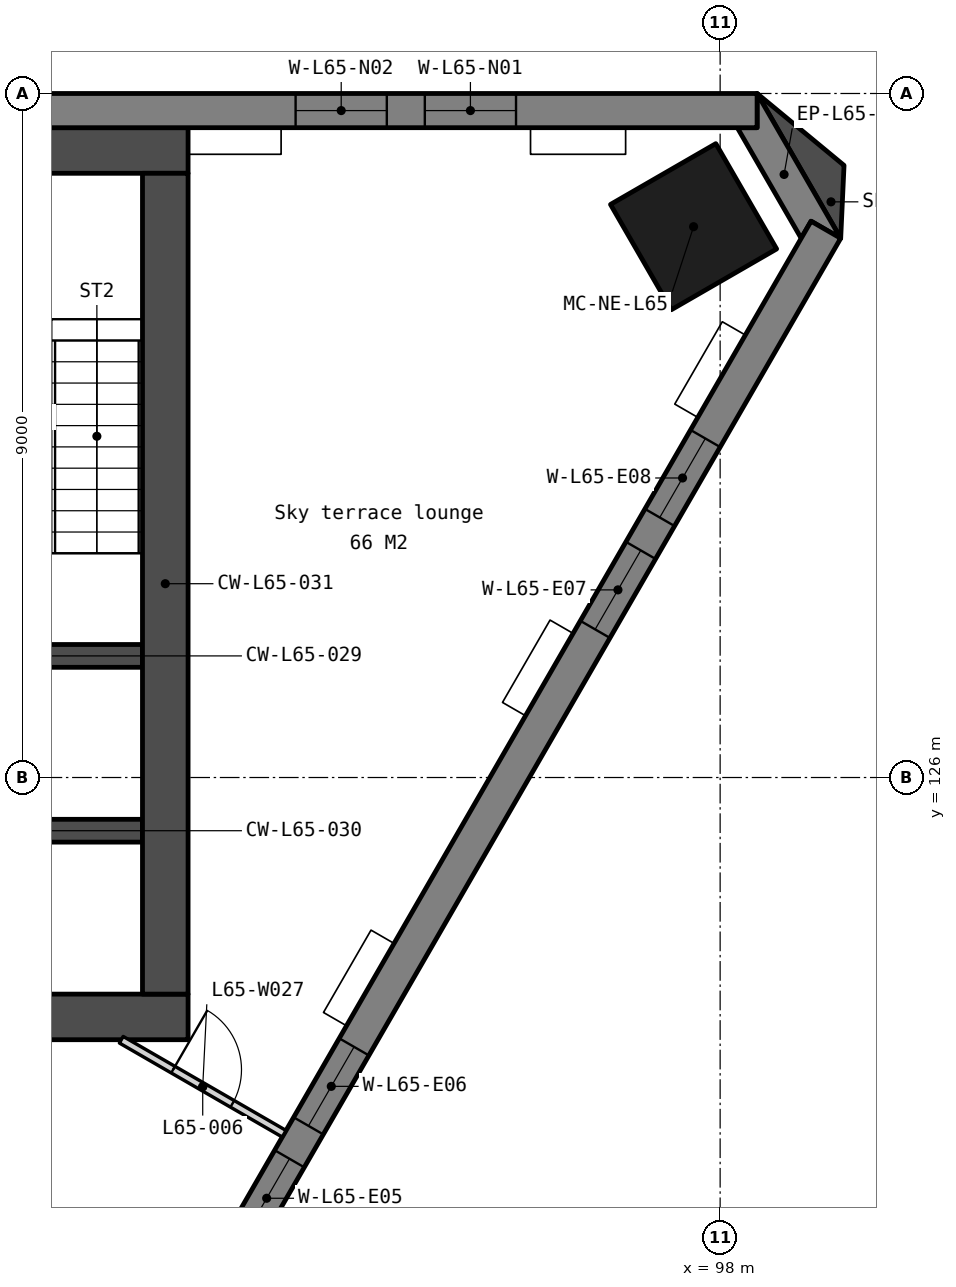
"""IFC4 building model, lengths in metres.
Left out: names, types, materials, properties, quantities, classifications, styles, units other than length and angle.
Written with IfcOpenShell. Run it as: python <this file> out.ifc"""

import sys

from ifc_helpers import new_model, si_unit, direction, frame, frame_2d, origin, origin_2d, place, context, subcontext, project, spatial, polyline, rectangle, outline, extrude, element, fill, save


model = new_model("IFC4")
c1 = context("Model", 3, precision=1e-05, world=origin(), true_north=direction((0.0, 1.0)))
c2 = subcontext(c1, "Body", "Model", "MODEL_VIEW")
j1 = project(units=[si_unit("LENGTHUNIT", "METRE"), si_unit("PLANEANGLEUNIT", "RADIAN")], contexts=[c1])
p1 = place(None, origin())
s1 = spatial("IfcSite", under=j1, at=p1, CompositionType="ELEMENT")
p2 = place(p1, origin())
s2 = spatial("IfcBuilding", under=s1, at=p2, CompositionType="ELEMENT")
p3 = place(p2, frame((0.0, 0.0, 266.0)))
s3 = spatial("IfcBuildingStorey", under=s2, at=p3, CompositionType="ELEMENT", Elevation=266.0)
p4 = place(p3, frame((97.651, 133.247, 0.0), z_axis=(0.0, 0.0, 1.0), x_axis=(-0.5, 0.866025403784, 0.0)))
e1 = element("IfcColumn", 1, at=p4, inside=s3, PredefinedType="COLUMN", context=c2, shape_type="SweptSolid", body=[
    extrude(rectangle(XDim=1.6, YDim=1.6, at=origin_2d()), origin(), (0.0, 0.0, 1.0), 3.9),
])
p5 = place(p3, frame((69.0, 134.25, 0.0), z_axis=(0.0, 0.0, 1.0), x_axis=(1.0, 0.0, 0.0)))
e2 = element("IfcWall", 2, at=p5, inside=s3, PredefinedType="SOLIDWALL", context=c2, shape_type="SweptSolid", body=[
    extrude(rectangle(XDim=22.0, YDim=0.6, at=frame_2d((11.0, 0.0))), origin(), (0.0, 0.0, 1.0), 3.75),
])
p6 = place(p3, frame((69.0, 122.85, 0.0), z_axis=(0.0, 0.0, 1.0), x_axis=(1.0, 0.0, 0.0)))
e3 = element("IfcWall", 3, at=p6, inside=s3, PredefinedType="SOLIDWALL", context=c2, shape_type="SweptSolid", body=[
    extrude(rectangle(XDim=22.0, YDim=0.6, at=frame_2d((11.0, 0.0))), origin(), (0.0, 0.0, 1.0), 3.75),
])
p7 = place(p6, frame((16.375, 0.0, 0.0)))
e4 = element("IfcOpeningElement", 4, at=p7, cuts=e3, PredefinedType="OPENING", context=c2, shape_type="SweptSolid", body=[
    extrude(rectangle(XDim=1.8, YDim=2.1, at=frame_2d((0.9, 1.05))), frame((0.0, 0.31, 0.0), z_axis=(0.0, -1.0, 0.0), x_axis=(1.0, 0.0, 0.0)), (0.0, 0.0, 1.0), 0.62),
])
p8 = place(p6, frame((3.825, 0.0, 0.0)))
e5 = element("IfcOpeningElement", 5, at=p8, cuts=e3, PredefinedType="OPENING", context=c2, shape_type="SweptSolid", body=[
    extrude(rectangle(XDim=1.8, YDim=2.1, at=frame_2d((0.9, 1.05))), frame((0.0, 0.31, 0.0), z_axis=(0.0, -1.0, 0.0), x_axis=(1.0, 0.0, 0.0)), (0.0, 0.0, 1.0), 0.62),
])
p9 = place(p6, frame((12.85, 0.0, 0.0)))
e6 = element("IfcOpeningElement", 6, at=p9, cuts=e3, PredefinedType="OPENING", context=c2, shape_type="SweptSolid", body=[
    extrude(rectangle(XDim=1.5, YDim=2.1, at=frame_2d((0.75, 1.05))), frame((0.0, 0.31, 0.0), z_axis=(0.0, -1.0, 0.0), x_axis=(1.0, 0.0, 0.0)), (0.0, 0.0, 1.0), 0.62),
])
for number, where, z_axis, x_axis in (
    (7, (87.85, 127.6, 0.0), (0.0, 0.0, 1.0), (1.0, 0.0, 0.0)),
    (8, (87.85, 125.3, 0.0), (0.0, 0.0, 1.0), (1.0, 0.0, 0.0)),
):
    element("IfcWall", number, at=place(p3, frame(where, z_axis=z_axis, x_axis=x_axis)), inside=s3, PredefinedType="SOLIDWALL", context=c2, shape_type="SweptSolid", body=[
        extrude(rectangle(XDim=2.55, YDim=0.3, at=frame_2d((1.275, 0.0))), origin(), (0.0, 0.0, 1.0), 3.75),
    ])
p10 = place(p3, frame((90.7, 133.95, 0.0), z_axis=(0.0, 0.0, 1.0), x_axis=(0.0, -1.0, 0.0)))
e9 = element("IfcWall", 9, at=p10, inside=s3, PredefinedType="SOLIDWALL", context=c2, shape_type="SweptSolid", body=[
    extrude(rectangle(XDim=10.8, YDim=0.6, at=frame_2d((5.4, 0.0))), origin(), (0.0, 0.0, 1.0), 3.75),
])
p11 = place(p3, frame((0.0, 0.0, -0.15)))
e10 = element("IfcWall", 10, at=p11, inside=s3, PredefinedType="SOLIDWALL", context=c2, shape_type="SweptSolid", body=[
    extrude(outline(polyline([(99.586, 133.095), (99.197, 133.32), (99.067, 133.095), (98.226, 134.55), (98.486, 134.55), (98.486, 135.0), (99.586, 133.095)])), origin(), (0.0, 0.0, 1.0), 3.9),
])
p12 = place(p3, frame((98.486, 134.775, -0.15), z_axis=(0.0, 0.0, 1.0), x_axis=(-1.0, 0.0, 0.0)))
e11 = element("IfcWall", 11, at=p12, inside=s3, PredefinedType="SOLIDWALL", context=c2, shape_type="SweptSolid", body=[
    extrude(outline(polyline([(36.972, 0.0), (36.972, 3.9), (0.0, 3.9), (0.0, 0.0), (36.972, 0.0)])), frame((0.0, 0.225, 0.0), z_axis=(0.0, -1.0, 0.0), x_axis=(1.0, 0.0, 0.0)), (0.0, 0.0, 1.0), 0.45),
])
p13 = place(p12, frame((3.172, 0.0, 0.95)))
e12 = element("IfcOpeningElement", 12, at=p13, cuts=e11, PredefinedType="OPENING", context=c2, shape_type="SweptSolid", body=[
    extrude(rectangle(XDim=1.2, YDim=2.2, at=frame_2d((0.6, 1.1))), frame((0.0, 0.235, 0.0), z_axis=(0.0, -1.0, 0.0), x_axis=(1.0, 0.0, 0.0)), (0.0, 0.0, 1.0), 0.47),
])
p14 = place(p12, frame((4.872, 0.0, 0.95)))
e13 = element("IfcOpeningElement", 13, at=p14, cuts=e11, PredefinedType="OPENING", context=c2, shape_type="SweptSolid", body=[
    extrude(rectangle(XDim=1.2, YDim=2.2, at=frame_2d((0.6, 1.1))), frame((0.0, 0.235, 0.0), z_axis=(0.0, -1.0, 0.0), x_axis=(1.0, 0.0, 0.0)), (0.0, 0.0, 1.0), 0.47),
])
p15 = place(p12, frame((12.415, 0.0, 0.95)))
e14 = element("IfcOpeningElement", 14, at=p15, cuts=e11, PredefinedType="OPENING", context=c2, shape_type="SweptSolid", body=[
    extrude(rectangle(XDim=1.2, YDim=2.2, at=frame_2d((0.6, 1.1))), frame((0.0, 0.235, 0.0), z_axis=(0.0, -1.0, 0.0), x_axis=(1.0, 0.0, 0.0)), (0.0, 0.0, 1.0), 0.47),
])
p16 = place(p12, frame((14.115, 0.0, 0.95)))
e15 = element("IfcOpeningElement", 15, at=p16, cuts=e11, PredefinedType="OPENING", context=c2, shape_type="SweptSolid", body=[
    extrude(rectangle(XDim=1.2, YDim=2.2, at=frame_2d((0.6, 1.1))), frame((0.0, 0.235, 0.0), z_axis=(0.0, -1.0, 0.0), x_axis=(1.0, 0.0, 0.0)), (0.0, 0.0, 1.0), 0.47),
])
p17 = place(p12, frame((21.658, 0.0, 0.95)))
e16 = element("IfcOpeningElement", 16, at=p17, cuts=e11, PredefinedType="OPENING", context=c2, shape_type="SweptSolid", body=[
    extrude(rectangle(XDim=1.2, YDim=2.2, at=frame_2d((0.6, 1.1))), frame((0.0, 0.235, 0.0), z_axis=(0.0, -1.0, 0.0), x_axis=(1.0, 0.0, 0.0)), (0.0, 0.0, 1.0), 0.47),
])
p18 = place(p12, frame((23.358, 0.0, 0.95)))
e17 = element("IfcOpeningElement", 17, at=p18, cuts=e11, PredefinedType="OPENING", context=c2, shape_type="SweptSolid", body=[
    extrude(rectangle(XDim=1.2, YDim=2.2, at=frame_2d((0.6, 1.1))), frame((0.0, 0.235, 0.0), z_axis=(0.0, -1.0, 0.0), x_axis=(1.0, 0.0, 0.0)), (0.0, 0.0, 1.0), 0.47),
])
p19 = place(p12, frame((30.901, 0.0, 0.95)))
e18 = element("IfcOpeningElement", 18, at=p19, cuts=e11, PredefinedType="OPENING", context=c2, shape_type="SweptSolid", body=[
    extrude(rectangle(XDim=1.2, YDim=2.2, at=frame_2d((0.6, 1.1))), frame((0.0, 0.235, 0.0), z_axis=(0.0, -1.0, 0.0), x_axis=(1.0, 0.0, 0.0)), (0.0, 0.0, 1.0), 0.47),
])
p20 = place(p12, frame((32.601, 0.0, 0.95)))
e19 = element("IfcOpeningElement", 19, at=p20, cuts=e11, PredefinedType="OPENING", context=c2, shape_type="SweptSolid", body=[
    extrude(rectangle(XDim=1.2, YDim=2.2, at=frame_2d((0.6, 1.1))), frame((0.0, 0.235, 0.0), z_axis=(0.0, -1.0, 0.0), x_axis=(1.0, 0.0, 0.0)), (0.0, 0.0, 1.0), 0.47),
])
p21 = place(p3, frame((80.905, 101.188, -0.15), z_axis=(0.0, 0.0, 1.0), x_axis=(0.500002536638, 0.866023939251, 0.0)))
e20 = element("IfcWall", 20, at=p21, inside=s3, PredefinedType="SOLIDWALL", context=c2, shape_type="SweptSolid", body=[
    extrude(outline(polyline([(36.972, 0.0), (36.972, 3.9), (0.0, 3.9), (0.0, 0.0), (36.972, 0.0)])), frame((0.0, 0.225, 0.0), z_axis=(0.0, -1.0, 0.0), x_axis=(1.0, 0.0, 0.0)), (0.0, 0.0, 1.0), 0.45),
])
p22 = place(p21, frame((3.172, 0.0, 0.95)))
e21 = element("IfcOpeningElement", 21, at=p22, cuts=e20, PredefinedType="OPENING", context=c2, shape_type="SweptSolid", body=[
    extrude(rectangle(XDim=1.2, YDim=2.2, at=frame_2d((0.6, 1.1))), frame((0.0, 0.235, 0.0), z_axis=(0.0, -1.0, 0.0), x_axis=(1.0, 0.0, 0.0)), (0.0, 0.0, 1.0), 0.47),
])
p23 = place(p21, frame((4.872, 0.0, 0.95)))
e22 = element("IfcOpeningElement", 22, at=p23, cuts=e20, PredefinedType="OPENING", context=c2, shape_type="SweptSolid", body=[
    extrude(rectangle(XDim=1.2, YDim=2.2, at=frame_2d((0.6, 1.1))), frame((0.0, 0.235, 0.0), z_axis=(0.0, -1.0, 0.0), x_axis=(1.0, 0.0, 0.0)), (0.0, 0.0, 1.0), 0.47),
])
p24 = place(p21, frame((12.415, 0.0, 0.95)))
e23 = element("IfcOpeningElement", 23, at=p24, cuts=e20, PredefinedType="OPENING", context=c2, shape_type="SweptSolid", body=[
    extrude(rectangle(XDim=1.2, YDim=2.2, at=frame_2d((0.6, 1.1))), frame((0.0, 0.235, 0.0), z_axis=(0.0, -1.0, 0.0), x_axis=(1.0, 0.0, 0.0)), (0.0, 0.0, 1.0), 0.47),
])
p25 = place(p21, frame((14.115, 0.0, 0.95)))
e24 = element("IfcOpeningElement", 24, at=p25, cuts=e20, PredefinedType="OPENING", context=c2, shape_type="SweptSolid", body=[
    extrude(rectangle(XDim=1.2, YDim=2.2, at=frame_2d((0.6, 1.1))), frame((0.0, 0.235, 0.0), z_axis=(0.0, -1.0, 0.0), x_axis=(1.0, 0.0, 0.0)), (0.0, 0.0, 1.0), 0.47),
])
p26 = place(p21, frame((21.658, 0.0, 0.95)))
e25 = element("IfcOpeningElement", 25, at=p26, cuts=e20, PredefinedType="OPENING", context=c2, shape_type="SweptSolid", body=[
    extrude(rectangle(XDim=1.2, YDim=2.2, at=frame_2d((0.6, 1.1))), frame((0.0, 0.235, 0.0), z_axis=(0.0, -1.0, 0.0), x_axis=(1.0, 0.0, 0.0)), (0.0, 0.0, 1.0), 0.47),
])
p27 = place(p21, frame((23.358, 0.0, 0.95)))
e26 = element("IfcOpeningElement", 26, at=p27, cuts=e20, PredefinedType="OPENING", context=c2, shape_type="SweptSolid", body=[
    extrude(rectangle(XDim=1.2, YDim=2.2, at=frame_2d((0.6, 1.1))), frame((0.0, 0.235, 0.0), z_axis=(0.0, -1.0, 0.0), x_axis=(1.0, 0.0, 0.0)), (0.0, 0.0, 1.0), 0.47),
])
p28 = place(p21, frame((30.901, 0.0, 0.95)))
e27 = element("IfcOpeningElement", 27, at=p28, cuts=e20, PredefinedType="OPENING", context=c2, shape_type="SweptSolid", body=[
    extrude(rectangle(XDim=1.2, YDim=2.2, at=frame_2d((0.6, 1.1))), frame((0.0, 0.235, 0.0), z_axis=(0.0, -1.0, 0.0), x_axis=(1.0, 0.0, 0.0)), (0.0, 0.0, 1.0), 0.47),
])
p29 = place(p21, frame((32.601, 0.0, 0.95)))
e28 = element("IfcOpeningElement", 28, at=p29, cuts=e20, PredefinedType="OPENING", context=c2, shape_type="SweptSolid", body=[
    extrude(rectangle(XDim=1.2, YDim=2.2, at=frame_2d((0.6, 1.1))), frame((0.0, 0.235, 0.0), z_axis=(0.0, -1.0, 0.0), x_axis=(1.0, 0.0, 0.0)), (0.0, 0.0, 1.0), 0.47),
])
p30 = place(p3, frame((0.0, 0.0, -0.15)))
e29 = element("IfcWall", 29, at=p30, inside=s3, PredefinedType="SOLIDWALL", context=c2, shape_type="SweptSolid", body=[
    extrude(outline(polyline([(99.586, 133.095), (99.63, 134.054), (98.486, 135.0), (99.586, 133.095)])), origin(), (0.0, 0.0, 1.0), 3.9),
])
p31 = place(p3, frame((90.121, 122.55, 0.0), z_axis=(0.0, 0.0, 1.0), x_axis=(0.86604923931, -0.499958713387, 0.0)))
e30 = element("IfcWall", 30, at=p31, inside=s3, PredefinedType="PARTITIONING", context=c2, shape_type="SweptSolid", body=[
    extrude(rectangle(XDim=2.475, YDim=0.1, at=frame_2d((1.237, 0.0))), origin(), (0.0, 0.0, 1.0), 3.75),
])
p32 = place(p31, frame((0.787, 0.0, 0.0)))
e31 = element("IfcOpeningElement", 31, at=p32, cuts=e30, PredefinedType="OPENING", context=c2, shape_type="SweptSolid", body=[
    extrude(rectangle(XDim=0.9, YDim=2.1, at=frame_2d((0.45, 1.05))), frame((0.0, 0.06, 0.0), z_axis=(0.0, -1.0, 0.0), x_axis=(1.0, 0.0, 0.0)), (0.0, 0.0, 1.0), 0.12),
])
p33 = place(p13, origin())
e32 = element("IfcWindow", 32, at=p33, inside=s3, PartitioningType="SINGLE_PANEL", PredefinedType="WINDOW", context=c2, shape_type="SweptSolid", body=[
    extrude(rectangle(XDim=1.2, YDim=2.2, at=frame_2d((0.6, 1.1))), frame((0.0, 0.03, 0.0), z_axis=(0.0, -1.0, 0.0), x_axis=(1.0, 0.0, 0.0)), (0.0, 0.0, 1.0), 0.06),
])
fill(e12, e32)
p34 = place(p14, origin())
e33 = element("IfcWindow", 33, at=p34, inside=s3, PartitioningType="SINGLE_PANEL", PredefinedType="WINDOW", context=c2, shape_type="SweptSolid", body=[
    extrude(rectangle(XDim=1.2, YDim=2.2, at=frame_2d((0.6, 1.1))), frame((0.0, 0.03, 0.0), z_axis=(0.0, -1.0, 0.0), x_axis=(1.0, 0.0, 0.0)), (0.0, 0.0, 1.0), 0.06),
])
fill(e13, e33)
p35 = place(p26, origin())
e34 = element("IfcWindow", 34, at=p35, inside=s3, PartitioningType="SINGLE_PANEL", PredefinedType="WINDOW", context=c2, shape_type="SweptSolid", body=[
    extrude(rectangle(XDim=1.2, YDim=2.2, at=frame_2d((0.6, 1.1))), frame((0.0, 0.03, 0.0), z_axis=(0.0, -1.0, 0.0), x_axis=(1.0, 0.0, 0.0)), (0.0, 0.0, 1.0), 0.06),
])
fill(e25, e34)
p36 = place(p27, origin())
e35 = element("IfcWindow", 35, at=p36, inside=s3, PartitioningType="SINGLE_PANEL", PredefinedType="WINDOW", context=c2, shape_type="SweptSolid", body=[
    extrude(rectangle(XDim=1.2, YDim=2.2, at=frame_2d((0.6, 1.1))), frame((0.0, 0.03, 0.0), z_axis=(0.0, -1.0, 0.0), x_axis=(1.0, 0.0, 0.0)), (0.0, 0.0, 1.0), 0.06),
])
fill(e26, e35)
p37 = place(p28, origin())
e36 = element("IfcWindow", 36, at=p37, inside=s3, PartitioningType="SINGLE_PANEL", PredefinedType="WINDOW", context=c2, shape_type="SweptSolid", body=[
    extrude(rectangle(XDim=1.2, YDim=2.2, at=frame_2d((0.6, 1.1))), frame((0.0, 0.03, 0.0), z_axis=(0.0, -1.0, 0.0), x_axis=(1.0, 0.0, 0.0)), (0.0, 0.0, 1.0), 0.06),
])
fill(e27, e36)
p38 = place(p29, origin())
e37 = element("IfcWindow", 37, at=p38, inside=s3, PartitioningType="SINGLE_PANEL", PredefinedType="WINDOW", context=c2, shape_type="SweptSolid", body=[
    extrude(rectangle(XDim=1.2, YDim=2.2, at=frame_2d((0.6, 1.1))), frame((0.0, 0.03, 0.0), z_axis=(0.0, -1.0, 0.0), x_axis=(1.0, 0.0, 0.0)), (0.0, 0.0, 1.0), 0.06),
])
fill(e28, e37)
p39 = place(p32, origin())
e38 = element("IfcDoor", 38, at=p39, inside=s3, OperationType="SINGLE_SWING_LEFT", PredefinedType="DOOR", context=c2, shape_type="SweptSolid", body=[
    extrude(rectangle(XDim=0.9, YDim=2.1, at=frame_2d((0.45, 1.05))), frame((0.0, 0.025, 0.0), z_axis=(0.0, -1.0, 0.0), x_axis=(1.0, 0.0, 0.0)), (0.0, 0.0, 1.0), 0.05),
])
fill(e31, e38)
save(model, sys.argv[1])
